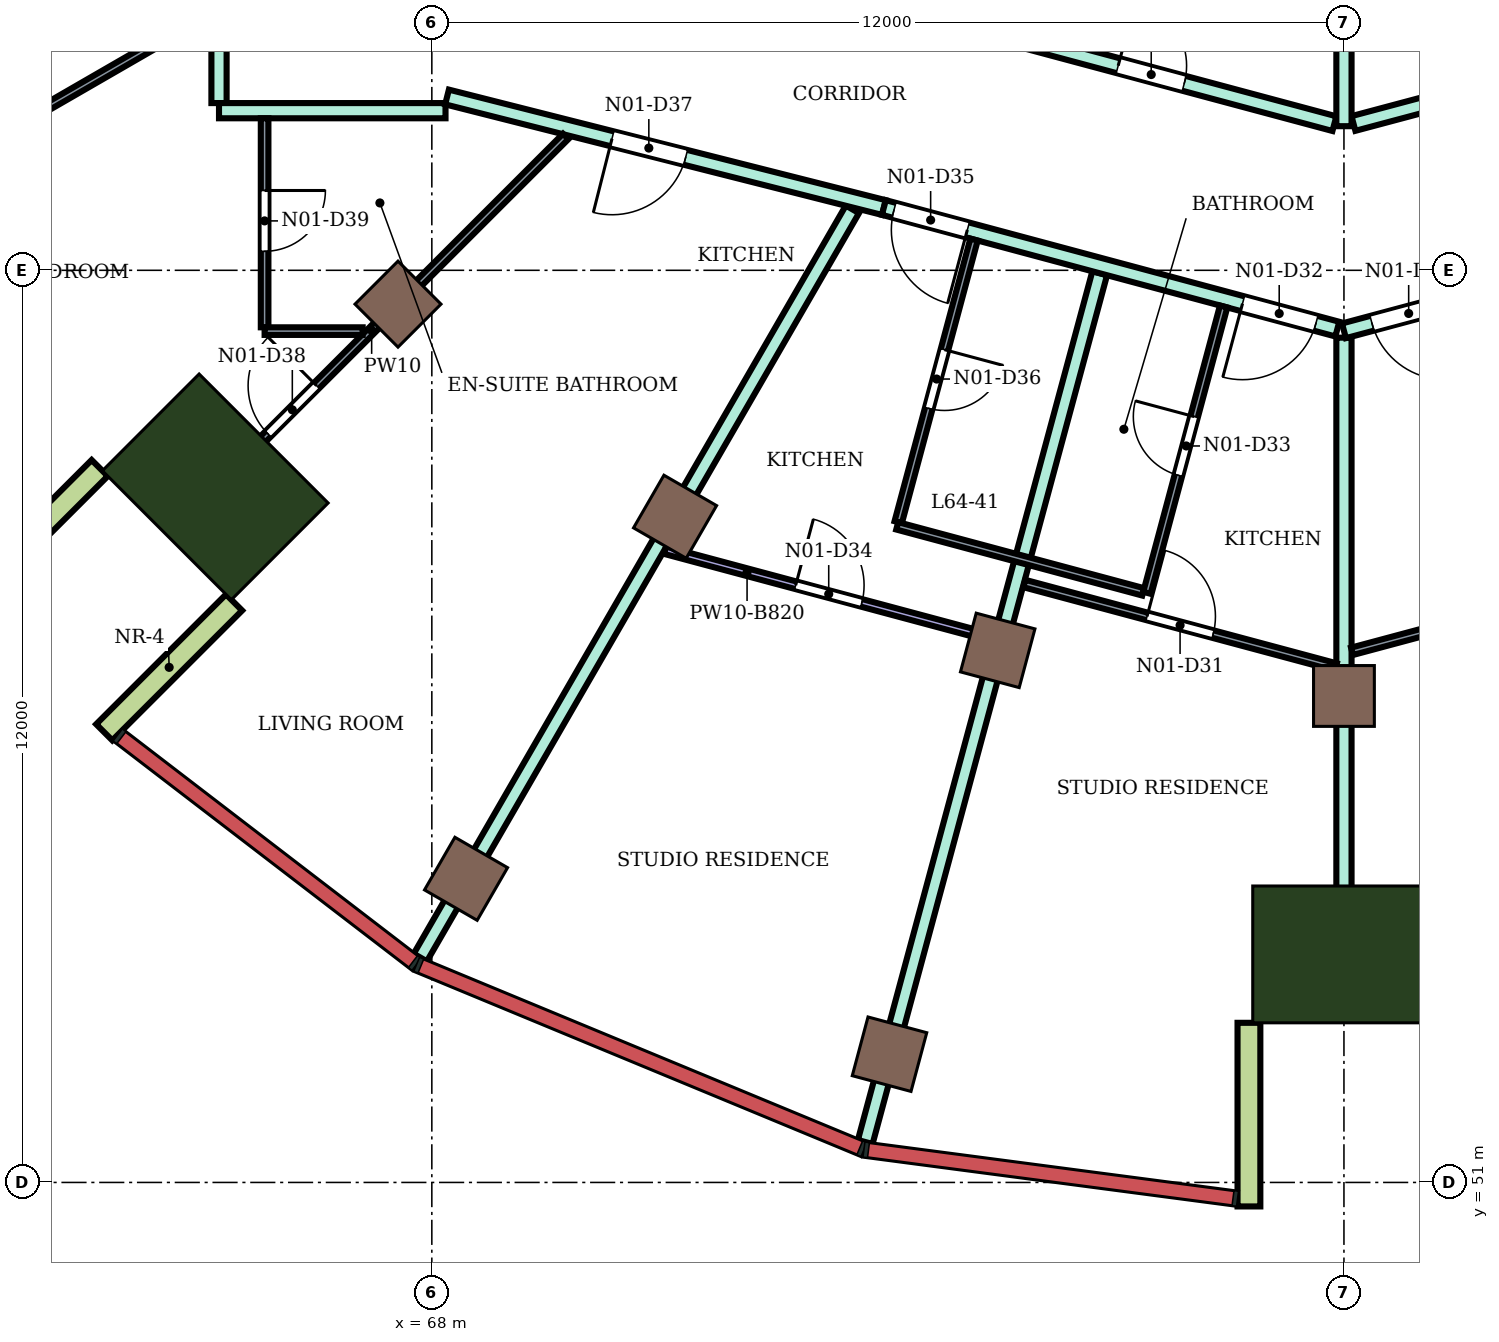
"""IFC4 building model, lengths in metres.
Left out: names, types, materials, properties, quantities, classifications, styles, units other than length and angle.
Written with IfcOpenShell. Run it as: python <this file> out.ifc"""

import sys

from ifc_helpers import new_model, si_unit, direction, frame, frame_2d, origin, origin_2d, place, context, subcontext, project, spatial, rectangle, extrude, element, fill, save


model = new_model("IFC4")
c1 = context("Model", 3, precision=1e-05, world=origin(), true_north=direction((0.0, 1.0)))
c2 = subcontext(c1, "Body", "Model", "MODEL_VIEW")
j1 = project(units=[si_unit("LENGTHUNIT", "METRE"), si_unit("PLANEANGLEUNIT", "RADIAN")], contexts=[c1])
p1 = place(None, origin())
s1 = spatial("IfcSite", under=j1, at=p1, CompositionType="ELEMENT")
p2 = place(p1, origin())
s2 = spatial("IfcBuilding", under=s1, at=p2, CompositionType="ELEMENT")
p3 = place(p2, frame((0.0, 0.0, 279.9)))
s3 = spatial("IfcBuildingStorey", under=s2, at=p3, CompositionType="ELEMENT", Elevation=279.9)
for number, where, z_axis, x_axis in (
    (1, (68.45, 54.995, 0.0), (0.0, 0.0, 1.0), (-0.5, -0.866, 0.0)),
    (2, (74.021, 52.687, 0.0), (0.0, 0.0, 1.0), (-0.259, -0.966, 0.0)),
    (3, (67.555, 62.555, 0.0), (0.0, 0.0, 1.0), (-0.707, -0.707, 0.0)),
    (4, (71.2, 59.758, 0.0), (0.0, 0.0, 1.0), (-0.5, -0.866, 0.0)),
    (5, (75.445, 58.0, 0.0), (0.0, 0.0, 1.0), (-0.259, -0.966, 0.0)),
    (6, (80.0, 57.4, 0.0), (0.0, 0.0, 1.0), (0.0, -1.0, 0.0)),
):
    element("IfcColumn", number, at=place(p3, frame(where, z_axis=z_axis, x_axis=x_axis)), inside=s3, PredefinedType="COLUMN", context=c2, shape_type="SweptSolid", body=[
        extrude(rectangle(XDim=0.8, YDim=0.8, at=origin_2d()), origin(), (0.0, 0.0, 1.0), 4.2),
    ])
for number, where, z_axis, x_axis in (
    (7, (65.151, 60.151, 0.0), (0.0, 0.0, 1.0), (-0.707, -0.707, 0.0)),
    (8, (80.0, 54.0, 0.0), (0.0, 0.0, 1.0), (0.0, -1.0, 0.0)),
):
    element("IfcColumn", number, at=place(p3, frame(where, z_axis=z_axis, x_axis=x_axis)), inside=s3, PredefinedType="COLUMN", context=c2, shape_type="SweptSolid", body=[
        extrude(rectangle(XDim=1.8, YDim=2.4, at=origin_2d()), origin(), (0.0, 0.0, 1.0), 4.2),
    ])
for number, where, z_axis, x_axis in (
    (9, (63.63, 60.398, 0.0), (0.0, 0.0, 1.0), (-0.707, -0.707, 0.0)),
    (10, (65.398, 58.63, 0.0), (0.0, 0.0, 1.0), (-0.707, -0.707, 0.0)),
):
    element("IfcWall", number, at=place(p3, frame(where, z_axis=z_axis, x_axis=x_axis)), inside=s3, PredefinedType="NOTDEFINED", context=c2, shape_type="SweptSolid", body=[
        extrude(rectangle(XDim=2.416, YDim=0.3, at=frame_2d((1.208, 0.0))), origin(), (0.0, 0.0, 1.0), 4.2),
    ])
p4 = place(p3, frame((78.75, 53.1, 0.0), z_axis=(0.0, 0.0, 1.0), x_axis=(0.0, -1.0, 0.0)))
e11 = element("IfcWall", 11, at=p4, inside=s3, PredefinedType="NOTDEFINED", context=c2, shape_type="SweptSolid", body=[
    extrude(rectangle(XDim=2.416, YDim=0.3, at=frame_2d((1.208, 0.0))), origin(), (0.0, 0.0, 1.0), 4.2),
])
p5 = place(p3, frame((65.2, 65.2, 0.0), z_axis=(0.0, 0.0, 1.0), x_axis=(0.0, 1.0, 0.0)))
e12 = element("IfcWall", 12, at=p5, inside=s3, PredefinedType="PARTITIONING", context=c2, shape_type="SweptSolid", body=[
    extrude(rectangle(XDim=1.15, YDim=0.2, at=frame_2d((0.575, 0.0))), origin(), (0.0, 0.0, 1.0), 3.75),
])
p6 = place(p3, frame((65.2, 65.1, 0.0), z_axis=(0.0, 0.0, 1.0), x_axis=(1.0, 0.0, 0.0)))
e13 = element("IfcWall", 13, at=p6, inside=s3, PredefinedType="PARTITIONING", context=c2, shape_type="SweptSolid", body=[
    extrude(rectangle(XDim=2.98, YDim=0.2, at=frame_2d((1.49, 0.0))), origin(), (0.0, 0.0, 1.0), 3.75),
])
p7 = place(p3, frame((67.848, 53.959, 0.0), z_axis=(0.0, 0.0, 1.0), x_axis=(0.500121565392, 0.865955206595, 0.0)))
e14 = element("IfcWall", 14, at=p7, inside=s3, PredefinedType="PARTITIONING", context=c2, shape_type="SweptSolid", body=[
    extrude(rectangle(XDim=11.366, YDim=0.2, at=frame_2d((5.683, 0.0))), origin(), (0.0, 0.0, 1.0), 3.75),
])
p8 = place(p3, frame((68.2, 65.28, 0.0), z_axis=(0.0, 0.0, 1.0), x_axis=(0.969440802773, -0.24532535523, 0.0)))
e15 = element("IfcWall", 15, at=p8, inside=s3, PredefinedType="PARTITIONING", context=c2, shape_type="SweptSolid", body=[
    extrude(rectangle(XDim=5.928, YDim=0.2, at=frame_2d((2.964, 0.0))), origin(), (0.0, 0.0, 1.0), 3.75),
])
p9 = place(p8, frame((2.239, 0.0, 0.0)))
e16 = element("IfcOpeningElement", 16, at=p9, cuts=e15, PredefinedType="OPENING", context=c2, shape_type="SweptSolid", body=[
    extrude(rectangle(XDim=1.0, YDim=2.1, at=frame_2d((0.5, 1.05))), frame((0.0, 0.11, 0.0), z_axis=(0.0, -1.0, 0.0), x_axis=(1.0, 0.0, 0.0)), (0.0, 0.0, 1.0), 0.22),
])
p10 = place(p3, frame((73.702, 51.532, 0.0), z_axis=(0.0, 0.0, 1.0), x_axis=(0.2605791587, 0.965452485652, 0.0)))
e17 = element("IfcWall", 17, at=p10, inside=s3, PredefinedType="PARTITIONING", context=c2, shape_type="SweptSolid", body=[
    extrude(rectangle(XDim=11.838, YDim=0.2, at=frame_2d((5.919, 0.0))), origin(), (0.0, 0.0, 1.0), 3.75),
])
p11 = place(p3, frame((73.947, 63.826, 0.0), z_axis=(0.0, 0.0, 1.0), x_axis=(0.965872508768, -0.25901794688, 0.0)))
e18 = element("IfcWall", 18, at=p11, inside=s3, PredefinedType="PARTITIONING", context=c2, shape_type="SweptSolid", body=[
    extrude(rectangle(XDim=6.177, YDim=0.2, at=frame_2d((3.088, 0.0))), origin(), (0.0, 0.0, 1.0), 3.75),
])
p12 = place(p11, frame((4.885, 0.0, 0.0)))
e19 = element("IfcOpeningElement", 19, at=p12, cuts=e18, PredefinedType="OPENING", context=c2, shape_type="SweptSolid", body=[
    extrude(rectangle(XDim=1.0, YDim=2.1, at=frame_2d((0.5, 1.05))), frame((0.0, 0.11, 0.0), z_axis=(0.0, -1.0, 0.0), x_axis=(1.0, 0.0, 0.0)), (0.0, 0.0, 1.0), 0.22),
])
p13 = place(p11, frame((0.137, 0.0, 0.0)))
e20 = element("IfcOpeningElement", 20, at=p13, cuts=e18, PredefinedType="OPENING", context=c2, shape_type="SweptSolid", body=[
    extrude(rectangle(XDim=1.0, YDim=2.1, at=frame_2d((0.5, 1.05))), frame((0.0, 0.11, 0.0), z_axis=(0.0, -1.0, 0.0), x_axis=(1.0, 0.0, 0.0)), (0.0, 0.0, 1.0), 0.22),
])
p14 = place(p3, frame((74.603, 66.342, 0.0), z_axis=(0.0, 0.0, 1.0), x_axis=(0.965920893652, -0.258837453254, 0.0)))
e21 = element("IfcWall", 21, at=p14, inside=s3, PredefinedType="PARTITIONING", context=c2, shape_type="SweptSolid", body=[
    extrude(rectangle(XDim=5.458, YDim=0.2, at=frame_2d((2.729, 0.0))), origin(), (0.0, 0.0, 1.0), 3.75),
])
p15 = place(p14, frame((2.512, 0.0, 0.0)))
e22 = element("IfcOpeningElement", 22, at=p15, cuts=e21, PredefinedType="OPENING", context=c2, shape_type="SweptSolid", body=[
    extrude(rectangle(XDim=0.9, YDim=2.1, at=frame_2d((0.45, 1.05))), frame((0.0, 0.11, 0.0), z_axis=(0.0, -1.0, 0.0), x_axis=(1.0, 0.0, 0.0)), (0.0, 0.0, 1.0), 0.22),
])
p16 = place(p3, frame((80.125, 64.932, 0.0), z_axis=(0.0, 0.0, 1.0), x_axis=(0.966236955806, 0.257655089674, 0.0)))
e23 = element("IfcWall", 23, at=p16, inside=s3, PredefinedType="PARTITIONING", context=c2, shape_type="SweptSolid", body=[
    extrude(rectangle(XDim=8.039, YDim=0.2, at=frame_2d((4.02, 0.0))), origin(), (0.0, 0.0, 1.0), 3.75),
])
p17 = place(p16, frame((6.298, 0.0, 0.0)))
e24 = element("IfcOpeningElement", 24, at=p17, cuts=e23, PredefinedType="OPENING", context=c2, shape_type="SweptSolid", body=[
    extrude(rectangle(XDim=0.9, YDim=2.1, at=frame_2d((0.45, 1.05))), frame((0.0, 0.11, 0.0), z_axis=(0.0, -1.0, 0.0), x_axis=(1.0, 0.0, 0.0)), (0.0, 0.0, 1.0), 0.22),
])
p18 = place(p16, frame((2.045, 0.0, 0.0)))
e25 = element("IfcOpeningElement", 25, at=p18, cuts=e23, PredefinedType="OPENING", context=c2, shape_type="SweptSolid", body=[
    extrude(rectangle(XDim=0.9, YDim=2.1, at=frame_2d((0.45, 1.05))), frame((0.0, 0.11, 0.0), z_axis=(0.0, -1.0, 0.0), x_axis=(1.0, 0.0, 0.0)), (0.0, 0.0, 1.0), 0.22),
])
p19 = place(p3, frame((80.0, 53.3, 0.0), z_axis=(0.0, 0.0, 1.0), x_axis=(0.0, 1.0, 0.0)))
e26 = element("IfcWall", 26, at=p19, inside=s3, PredefinedType="PARTITIONING", context=c2, shape_type="SweptSolid", body=[
    extrude(rectangle(XDim=8.814, YDim=0.2, at=frame_2d((4.407, 0.0))), origin(), (0.0, 0.0, 1.0), 3.75),
])
p20 = place(p3, frame((80.0, 62.204, 0.0), z_axis=(0.0, 0.0, 1.0), x_axis=(0.965960221635, 0.258690645788, 0.0)))
e27 = element("IfcWall", 27, at=p20, inside=s3, PredefinedType="PARTITIONING", context=c2, shape_type="SweptSolid", body=[
    extrude(rectangle(XDim=6.267, YDim=0.2, at=frame_2d((3.133, 0.0))), origin(), (0.0, 0.0, 1.0), 3.75),
])
p21 = place(p20, frame((0.382, 0.0, 0.0)))
e28 = element("IfcOpeningElement", 28, at=p21, cuts=e27, PredefinedType="OPENING", context=c2, shape_type="SweptSolid", body=[
    extrude(rectangle(XDim=1.0, YDim=2.1, at=frame_2d((0.5, 1.05))), frame((0.0, 0.11, 0.0), z_axis=(0.0, -1.0, 0.0), x_axis=(1.0, 0.0, 0.0)), (0.0, 0.0, 1.0), 0.22),
])
p22 = place(p3, frame((80.0, 64.896, 0.0), z_axis=(0.0, 0.0, 1.0), x_axis=(0.0, 1.0, 0.0)))
e29 = element("IfcWall", 29, at=p22, inside=s3, PredefinedType="PARTITIONING", context=c2, shape_type="SweptSolid", body=[
    extrude(rectangle(XDim=2.405, YDim=0.2, at=frame_2d((1.203, 0.0))), origin(), (0.0, 0.0, 1.0), 3.75),
])
p23 = place(p3, frame((58.958, 62.851, 0.0), z_axis=(0.0, 0.0, 1.0), x_axis=(0.866044015472, 0.499967762227, 0.0)))
e30 = element("IfcWall", 30, at=p23, inside=s3, PredefinedType="PARTITIONING", context=c2, shape_type="SweptSolid", body=[
    extrude(rectangle(XDim=7.208, YDim=0.1, at=frame_2d((3.604, 0.0))), origin(), (0.0, 0.0, 1.0), 3.75),
])
p24 = place(p23, frame((3.179, 0.0, 0.0)))
e31 = element("IfcOpeningElement", 31, at=p24, cuts=e30, PredefinedType="OPENING", context=c2, shape_type="SweptSolid", body=[
    extrude(rectangle(XDim=0.9, YDim=2.1, at=frame_2d((0.45, 1.05))), frame((0.0, 0.06, 0.0), z_axis=(0.0, -1.0, 0.0), x_axis=(1.0, 0.0, 0.0)), (0.0, 0.0, 1.0), 0.12),
])
p25 = place(p3, frame((64.656, 59.656, 0.0), z_axis=(0.0, 0.0, 1.0), x_axis=(0.707106781187, 0.707106781187, 0.0)))
e32 = element("IfcWall", 32, at=p25, inside=s3, PredefinedType="PARTITIONING", context=c2, shape_type="SweptSolid", body=[
    extrude(rectangle(XDim=7.22, YDim=0.1, at=frame_2d((3.61, 0.0))), origin(), (0.0, 0.0, 1.0), 3.75),
])
p26 = place(p25, frame((1.684, 0.0, 0.0)))
e33 = element("IfcOpeningElement", 33, at=p26, cuts=e32, PredefinedType="OPENING", context=c2, shape_type="SweptSolid", body=[
    extrude(rectangle(XDim=0.9, YDim=2.1, at=frame_2d((0.45, 1.05))), frame((0.0, 0.06, 0.0), z_axis=(0.0, -1.0, 0.0), x_axis=(1.0, 0.0, 0.0)), (0.0, 0.0, 1.0), 0.12),
])
p27 = place(p3, frame((65.8, 62.25, 0.0), z_axis=(0.0, 0.0, 1.0), x_axis=(0.0, 1.0, 0.0)))
e34 = element("IfcWall", 34, at=p27, inside=s3, PredefinedType="PARTITIONING", context=c2, shape_type="SweptSolid", body=[
    extrude(rectangle(XDim=2.75, YDim=0.1, at=frame_2d((1.375, 0.0))), origin(), (0.0, 0.0, 1.0), 3.75),
])
p28 = place(p27, frame((1.0, 0.0, 0.0)))
e35 = element("IfcOpeningElement", 35, at=p28, cuts=e34, PredefinedType="OPENING", context=c2, shape_type="SweptSolid", body=[
    extrude(rectangle(XDim=0.8, YDim=2.1, at=frame_2d((0.4, 1.05))), frame((0.0, 0.06, 0.0), z_axis=(0.0, -1.0, 0.0), x_axis=(1.0, 0.0, 0.0)), (0.0, 0.0, 1.0), 0.12),
])
p29 = place(p3, frame((65.8, 62.2, 0.0), z_axis=(0.0, 0.0, 1.0), x_axis=(1.0, 0.0, 0.0)))
e36 = element("IfcWall", 36, at=p29, inside=s3, PredefinedType="PARTITIONING", context=c2, shape_type="SweptSolid", body=[
    extrude(rectangle(XDim=1.29, YDim=0.1, at=frame_2d((0.645, 0.0))), origin(), (0.0, 0.0, 1.0), 3.75),
])
p30 = place(p3, frame((71.068, 59.317, 0.0), z_axis=(0.0, 0.0, 1.0), x_axis=(0.965923173799, -0.258828944127, 0.0)))
e37 = element("IfcWall", 37, at=p30, inside=s3, PredefinedType="PARTITIONING", context=c2, shape_type="SweptSolid", body=[
    extrude(rectangle(XDim=4.468, YDim=0.1, at=frame_2d((2.234, 0.0))), origin(), (0.0, 0.0, 1.0), 3.38),
])
p31 = place(p30, frame((1.779, 0.0, 0.0)))
e38 = element("IfcOpeningElement", 38, at=p31, cuts=e37, PredefinedType="OPENING", context=c2, shape_type="SweptSolid", body=[
    extrude(rectangle(XDim=0.9, YDim=2.1, at=frame_2d((0.45, 1.05))), frame((0.0, 0.06, 0.0), z_axis=(0.0, -1.0, 0.0), x_axis=(1.0, 0.0, 0.0)), (0.0, 0.0, 1.0), 0.12),
])
p32 = place(p3, frame((74.136, 59.686, 0.0), z_axis=(0.0, 0.0, 1.0), x_axis=(0.259020336752, 0.965871867873, 0.0)))
e39 = element("IfcWall", 39, at=p32, inside=s3, PredefinedType="PARTITIONING", context=c2, shape_type="SweptSolid", body=[
    extrude(rectangle(XDim=3.849, YDim=0.1, at=frame_2d((1.925, 0.0))), origin(), (0.0, 0.0, 1.0), 3.75),
])
p33 = place(p32, frame((1.55, 0.0, 0.0)))
e40 = element("IfcOpeningElement", 40, at=p33, cuts=e39, PredefinedType="OPENING", context=c2, shape_type="SweptSolid", body=[
    extrude(rectangle(XDim=0.8, YDim=2.1, at=frame_2d((0.4, 1.05))), frame((0.0, 0.06, 0.0), z_axis=(0.0, -1.0, 0.0), x_axis=(1.0, 0.0, 0.0)), (0.0, 0.0, 1.0), 0.12),
])
p34 = place(p3, frame((74.123, 59.638, 0.0), z_axis=(0.0, 0.0, 1.0), x_axis=(0.965820152698, -0.259213102761, 0.0)))
e41 = element("IfcWall", 41, at=p34, inside=s3, PredefinedType="PARTITIONING", context=c2, shape_type="SweptSolid", body=[
    extrude(rectangle(XDim=3.351, YDim=0.1, at=frame_2d((1.676, 0.0))), origin(), (0.0, 0.0, 1.0), 3.75),
])
p35 = place(p3, frame((75.795, 58.879, 0.0), z_axis=(0.0, 0.0, 1.0), x_axis=(0.965895141847, -0.258933533857, 0.0)))
e42 = element("IfcWall", 42, at=p35, inside=s3, PredefinedType="PARTITIONING", context=c2, shape_type="SweptSolid", body=[
    extrude(rectangle(XDim=4.244, YDim=0.1, at=frame_2d((2.122, 0.0))), origin(), (0.0, 0.0, 1.0), 3.75),
])
p36 = place(p35, frame((1.672, 0.0, 0.0)))
e43 = element("IfcOpeningElement", 43, at=p36, cuts=e42, PredefinedType="OPENING", context=c2, shape_type="SweptSolid", body=[
    extrude(rectangle(XDim=0.9, YDim=2.1, at=frame_2d((0.45, 1.05))), frame((0.0, 0.06, 0.0), z_axis=(0.0, -1.0, 0.0), x_axis=(1.0, 0.0, 0.0)), (0.0, 0.0, 1.0), 0.12),
])
p37 = place(p3, frame((77.408, 58.757, 0.0), z_axis=(0.0, 0.0, 1.0), x_axis=(0.258718354301, 0.965952800683, 0.0)))
e44 = element("IfcWall", 44, at=p37, inside=s3, PredefinedType="PARTITIONING", context=c2, shape_type="SweptSolid", body=[
    extrude(rectangle(XDim=3.9, YDim=0.1, at=frame_2d((1.95, 0.0))), origin(), (0.0, 0.0, 1.0), 3.75),
])
p38 = place(p37, frame((1.6, 0.0, 0.0)))
e45 = element("IfcOpeningElement", 45, at=p38, cuts=e44, PredefinedType="OPENING", context=c2, shape_type="SweptSolid", body=[
    extrude(rectangle(XDim=0.8, YDim=2.1, at=frame_2d((0.4, 1.05))), frame((0.0, 0.06, 0.0), z_axis=(0.0, -1.0, 0.0), x_axis=(1.0, 0.0, 0.0)), (0.0, 0.0, 1.0), 0.12),
])
p39 = place(p3, frame((80.106, 57.988, 0.0), z_axis=(0.0, 0.0, 1.0), x_axis=(0.965893555682, 0.25893945063, 0.0)))
e46 = element("IfcWall", 46, at=p39, inside=s3, PredefinedType="PARTITIONING", context=c2, shape_type="SweptSolid", body=[
    extrude(rectangle(XDim=4.2, YDim=0.1, at=frame_2d((2.1, 0.0))), origin(), (0.0, 0.0, 1.0), 3.75),
])
p40 = place(p39, frame((1.645, 0.0, 0.0)))
e47 = element("IfcOpeningElement", 47, at=p40, cuts=e46, PredefinedType="OPENING", context=c2, shape_type="SweptSolid", body=[
    extrude(rectangle(XDim=0.9, YDim=2.1, at=frame_2d((0.45, 1.05))), frame((0.0, 0.06, 0.0), z_axis=(0.0, -1.0, 0.0), x_axis=(1.0, 0.0, 0.0)), (0.0, 0.0, 1.0), 0.12),
])
p41 = place(p21, frame((1.0, 0.0, 0.0), z_axis=(0.0, 0.0, 1.0), x_axis=(-1.0, 0.0, 0.0)))
e48 = element("IfcDoor", 48, at=p41, inside=s3, OperationType="SINGLE_SWING_LEFT", PredefinedType="DOOR", context=c2, shape_type="SweptSolid", body=[
    extrude(rectangle(XDim=1.0, YDim=2.1, at=frame_2d((0.5, 1.05))), frame((0.0, 0.025, 0.0), z_axis=(0.0, -1.0, 0.0), x_axis=(1.0, 0.0, 0.0)), (0.0, 0.0, 1.0), 0.05),
])
fill(e28, e48)
p42 = place(p36, origin())
e49 = element("IfcDoor", 49, at=p42, inside=s3, OperationType="SINGLE_SWING_LEFT", PredefinedType="DOOR", context=c2, shape_type="SweptSolid", body=[
    extrude(rectangle(XDim=0.9, YDim=2.1, at=frame_2d((0.45, 1.05))), frame((0.0, 0.025, 0.0), z_axis=(0.0, -1.0, 0.0), x_axis=(1.0, 0.0, 0.0)), (0.0, 0.0, 1.0), 0.05),
])
fill(e43, e49)
p43 = place(p12, frame((1.0, 0.0, 0.0), z_axis=(0.0, 0.0, 1.0), x_axis=(-1.0, 0.0, 0.0)))
e50 = element("IfcDoor", 50, at=p43, inside=s3, OperationType="SINGLE_SWING_RIGHT", PredefinedType="DOOR", context=c2, shape_type="SweptSolid", body=[
    extrude(rectangle(XDim=1.0, YDim=2.1, at=frame_2d((0.5, 1.05))), frame((0.0, 0.025, 0.0), z_axis=(0.0, -1.0, 0.0), x_axis=(1.0, 0.0, 0.0)), (0.0, 0.0, 1.0), 0.05),
])
fill(e19, e50)
p44 = place(p38, origin())
e51 = element("IfcDoor", 51, at=p44, inside=s3, OperationType="SINGLE_SWING_RIGHT", PredefinedType="DOOR", context=c2, shape_type="SweptSolid", body=[
    extrude(rectangle(XDim=0.8, YDim=2.1, at=frame_2d((0.4, 1.05))), frame((0.0, 0.025, 0.0), z_axis=(0.0, -1.0, 0.0), x_axis=(1.0, 0.0, 0.0)), (0.0, 0.0, 1.0), 0.05),
])
fill(e45, e51)
p45 = place(p31, origin())
e52 = element("IfcDoor", 52, at=p45, inside=s3, OperationType="SINGLE_SWING_LEFT", PredefinedType="DOOR", context=c2, shape_type="SweptSolid", body=[
    extrude(rectangle(XDim=0.9, YDim=2.1, at=frame_2d((0.45, 1.05))), frame((0.0, 0.025, 0.0), z_axis=(0.0, -1.0, 0.0), x_axis=(1.0, 0.0, 0.0)), (0.0, 0.0, 1.0), 0.05),
])
fill(e38, e52)
p46 = place(p13, frame((1.0, 0.0, 0.0), z_axis=(0.0, 0.0, 1.0), x_axis=(-1.0, 0.0, 0.0)))
e53 = element("IfcDoor", 53, at=p46, inside=s3, OperationType="SINGLE_SWING_LEFT", PredefinedType="DOOR", context=c2, shape_type="SweptSolid", body=[
    extrude(rectangle(XDim=1.0, YDim=2.1, at=frame_2d((0.5, 1.05))), frame((0.0, 0.025, 0.0), z_axis=(0.0, -1.0, 0.0), x_axis=(1.0, 0.0, 0.0)), (0.0, 0.0, 1.0), 0.05),
])
fill(e20, e53)
p47 = place(p33, frame((0.8, 0.0, 0.0), z_axis=(0.0, 0.0, 1.0), x_axis=(-1.0, 0.0, 0.0)))
e54 = element("IfcDoor", 54, at=p47, inside=s3, OperationType="SINGLE_SWING_LEFT", PredefinedType="DOOR", context=c2, shape_type="SweptSolid", body=[
    extrude(rectangle(XDim=0.8, YDim=2.1, at=frame_2d((0.4, 1.05))), frame((0.0, 0.025, 0.0), z_axis=(0.0, -1.0, 0.0), x_axis=(1.0, 0.0, 0.0)), (0.0, 0.0, 1.0), 0.05),
])
fill(e40, e54)
p48 = place(p9, frame((1.0, 0.0, 0.0), z_axis=(0.0, 0.0, 1.0), x_axis=(-1.0, 0.0, 0.0)))
e55 = element("IfcDoor", 55, at=p48, inside=s3, OperationType="SINGLE_SWING_RIGHT", PredefinedType="DOOR", context=c2, shape_type="SweptSolid", body=[
    extrude(rectangle(XDim=1.0, YDim=2.1, at=frame_2d((0.5, 1.05))), frame((0.0, 0.025, 0.0), z_axis=(0.0, -1.0, 0.0), x_axis=(1.0, 0.0, 0.0)), (0.0, 0.0, 1.0), 0.05),
])
fill(e16, e55)
p49 = place(p26, origin())
e56 = element("IfcDoor", 56, at=p49, inside=s3, OperationType="SINGLE_SWING_RIGHT", PredefinedType="DOOR", context=c2, shape_type="SweptSolid", body=[
    extrude(rectangle(XDim=0.9, YDim=2.1, at=frame_2d((0.45, 1.05))), frame((0.0, 0.025, 0.0), z_axis=(0.0, -1.0, 0.0), x_axis=(1.0, 0.0, 0.0)), (0.0, 0.0, 1.0), 0.05),
])
fill(e33, e56)
p50 = place(p28, frame((0.8, 0.0, 0.0), z_axis=(0.0, 0.0, 1.0), x_axis=(-1.0, 0.0, 0.0)))
e57 = element("IfcDoor", 57, at=p50, inside=s3, OperationType="SINGLE_SWING_LEFT", PredefinedType="DOOR", context=c2, shape_type="SweptSolid", body=[
    extrude(rectangle(XDim=0.8, YDim=2.1, at=frame_2d((0.4, 1.05))), frame((0.0, 0.025, 0.0), z_axis=(0.0, -1.0, 0.0), x_axis=(1.0, 0.0, 0.0)), (0.0, 0.0, 1.0), 0.05),
])
fill(e35, e57)
p51 = place(p15, origin())
e58 = element("IfcDoor", 58, at=p51, inside=s3, OperationType="SINGLE_SWING_LEFT", PredefinedType="DOOR", context=c2, shape_type="SweptSolid", body=[
    extrude(rectangle(XDim=0.9, YDim=2.1, at=frame_2d((0.45, 1.05))), frame((0.0, 0.025, 0.0), z_axis=(0.0, -1.0, 0.0), x_axis=(1.0, 0.0, 0.0)), (0.0, 0.0, 1.0), 0.05),
])
fill(e22, e58)
save(model, sys.argv[1])
